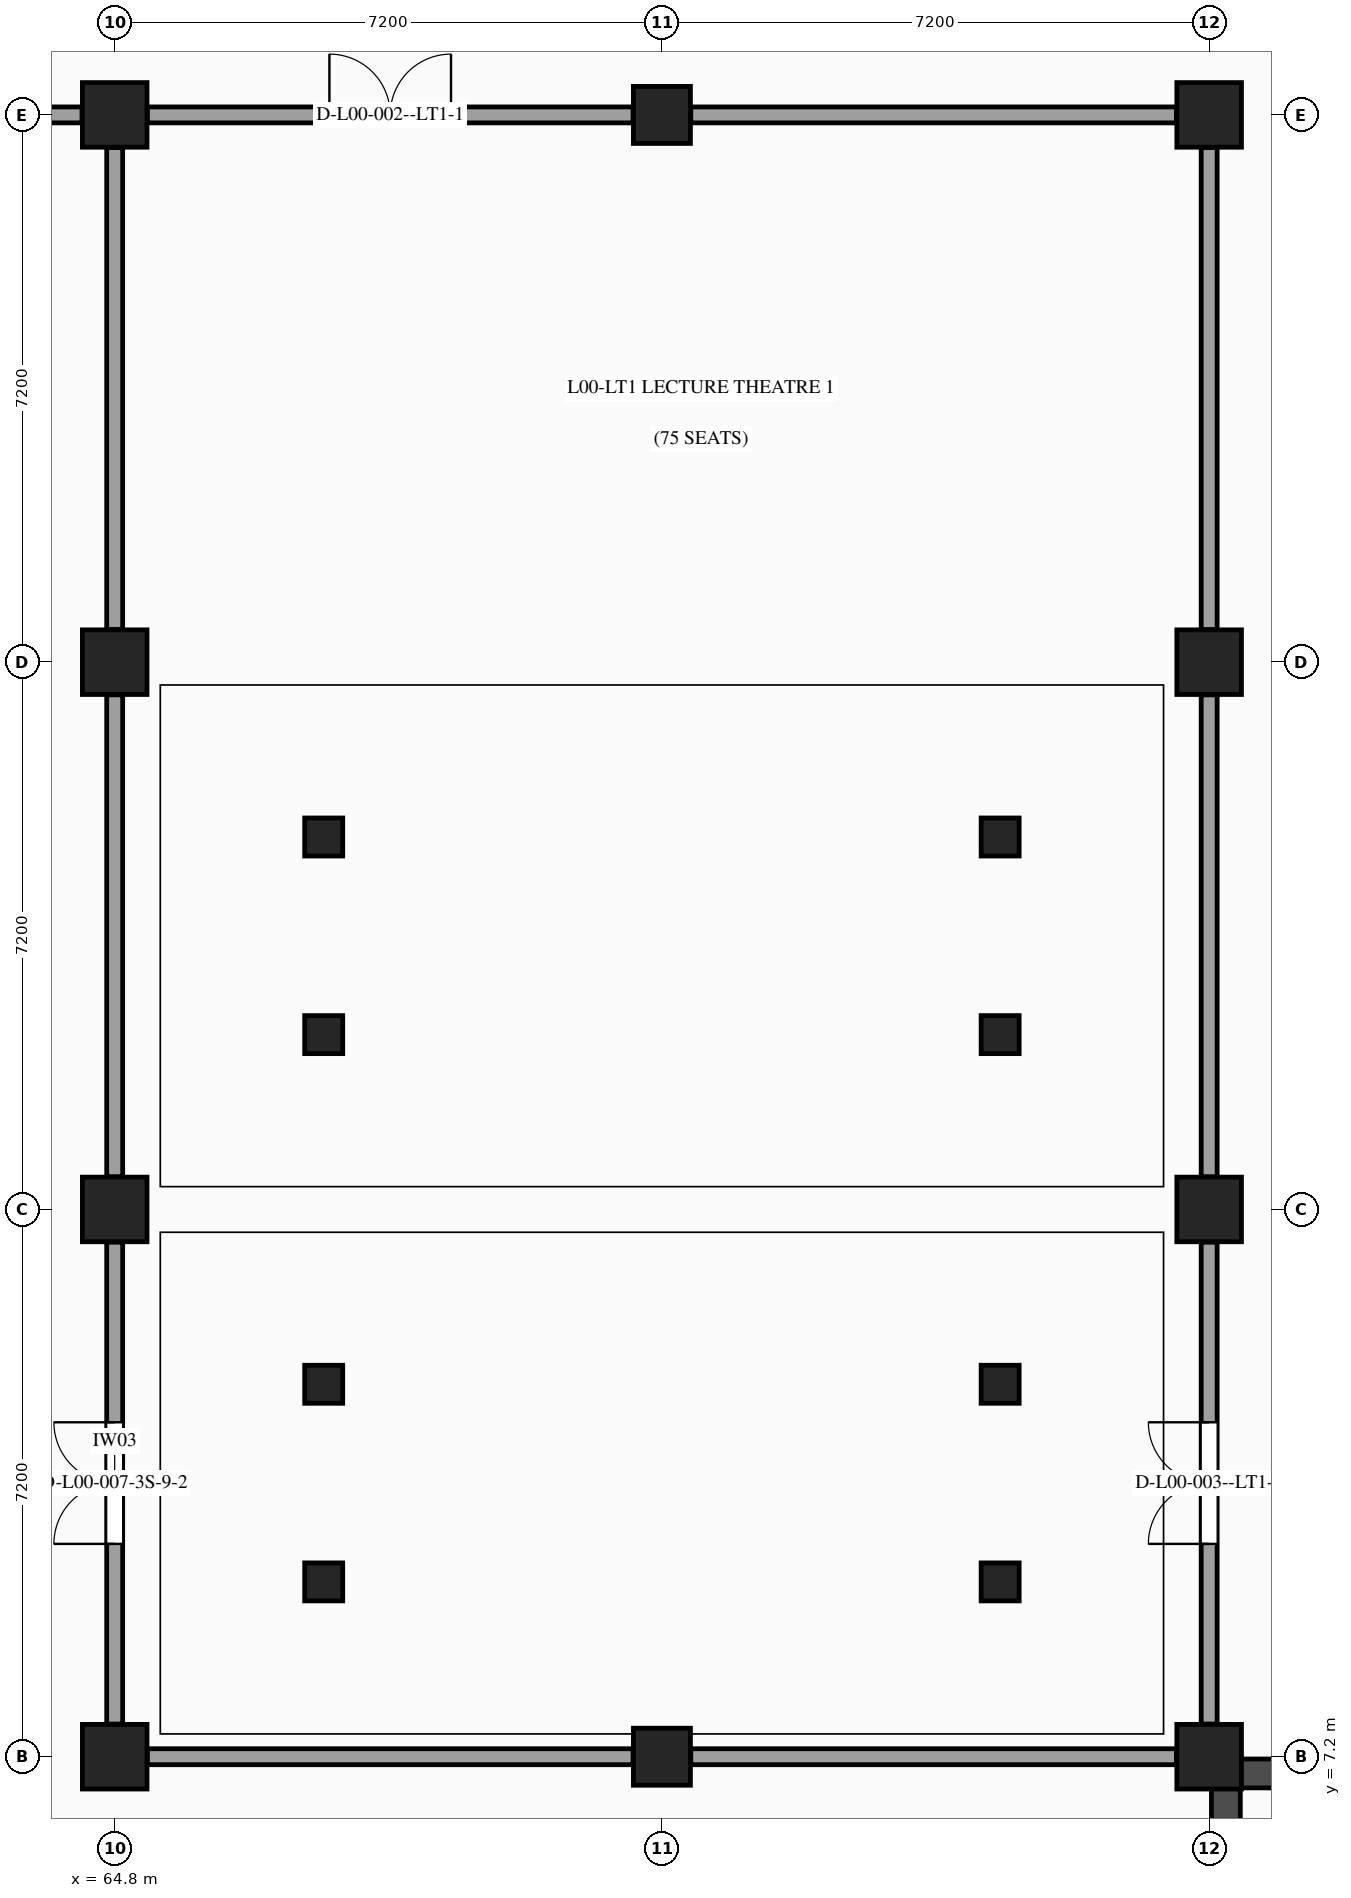
"""IFC4 building model, lengths in metres.
Left out: names, types, materials, properties, quantities, classifications, styles, units other than length and angle.
Written with IfcOpenShell. Run it as: python <this file> out.ifc"""

import sys

from ifc_helpers import new_model, si_unit, direction, frame, frame_2d, origin, origin_2d, place, context, subcontext, project, spatial, rectangle, extrude, element, fill, save


model = new_model("IFC4")
c1 = context("Model", 3, precision=1e-05, world=origin(), true_north=direction((0.0, 1.0)))
c2 = subcontext(c1, "Body", "Model", "MODEL_VIEW")
j1 = project(units=[si_unit("LENGTHUNIT", "METRE"), si_unit("PLANEANGLEUNIT", "RADIAN")], contexts=[c1])
p1 = place(None, origin())
s1 = spatial("IfcSite", under=j1, at=p1, CompositionType="ELEMENT")
p2 = place(p1, origin())
s2 = spatial("IfcBuilding", under=s1, at=p2, CompositionType="ELEMENT")
p3 = place(p2, origin())
s3 = spatial("IfcBuildingStorey", under=s2, at=p3, CompositionType="ELEMENT", Elevation=0.0)
for number, where, z_axis, x_axis in (
    (1, (64.8, 7.2, 0.0), (0.0, 0.0, 1.0), (1.0, 0.0, 0.0)),
    (2, (64.8, 14.4, 0.0), (0.0, 0.0, 1.0), (1.0, 0.0, 0.0)),
    (3, (64.8, 21.6, 0.0), (0.0, 0.0, 1.0), (1.0, 0.0, 0.0)),
    (4, (64.8, 28.8, 0.0), (0.0, 0.0, 1.0), (1.0, 0.0, 0.0)),
):
    element("IfcColumn", number, at=place(p3, frame(where, z_axis=z_axis, x_axis=x_axis)), inside=s3, PredefinedType="COLUMN", context=c2, shape_type="SweptSolid", body=[
        extrude(rectangle(XDim=0.85, YDim=0.85, at=origin_2d()), origin(), (0.0, 0.0, 1.0), 5.4),
    ])
for number, where, z_axis, x_axis in (
    (5, (72.0, 7.2, 0.0), (0.0, 0.0, 1.0), (1.0, 0.0, 0.0)),
    (6, (72.0, 28.8, 0.0), (0.0, 0.0, 1.0), (1.0, 0.0, 0.0)),
):
    element("IfcColumn", number, at=place(p3, frame(where, z_axis=z_axis, x_axis=x_axis)), inside=s3, PredefinedType="COLUMN", context=c2, shape_type="SweptSolid", body=[
        extrude(rectangle(XDim=0.75, YDim=0.75, at=origin_2d()), origin(), (0.0, 0.0, 1.0), 5.4),
    ])
for number, where, z_axis, x_axis in (
    (7, (79.2, 7.2, 0.0), (0.0, 0.0, 1.0), (1.0, 0.0, 0.0)),
    (8, (79.2, 14.4, 0.0), (0.0, 0.0, 1.0), (1.0, 0.0, 0.0)),
    (9, (79.2, 21.6, 0.0), (0.0, 0.0, 1.0), (1.0, 0.0, 0.0)),
    (10, (79.2, 28.8, 0.0), (0.0, 0.0, 1.0), (1.0, 0.0, 0.0)),
):
    element("IfcColumn", number, at=place(p3, frame(where, z_axis=z_axis, x_axis=x_axis)), inside=s3, PredefinedType="COLUMN", context=c2, shape_type="SweptSolid", body=[
        extrude(rectangle(XDim=0.85, YDim=0.85, at=origin_2d()), origin(), (0.0, 0.0, 1.0), 5.4),
    ])
for number, where, z_axis, x_axis in (
    (11, (67.55, 9.5, 0.0), (0.0, 0.0, 1.0), (1.0, 0.0, 0.0)),
    (12, (67.55, 12.1, 0.0), (0.0, 0.0, 1.0), (1.0, 0.0, 0.0)),
    (13, (76.45, 9.5, 0.0), (0.0, 0.0, 1.0), (1.0, 0.0, 0.0)),
    (14, (76.45, 12.1, 0.0), (0.0, 0.0, 1.0), (1.0, 0.0, 0.0)),
):
    element("IfcColumn", number, at=place(p3, frame(where, z_axis=z_axis, x_axis=x_axis)), inside=s3, PredefinedType="COLUMN", context=c2, shape_type="SweptSolid", body=[
        extrude(rectangle(XDim=0.5, YDim=0.5, at=origin_2d()), origin(), (0.0, 0.0, 1.0), 1.27),
    ])
for number, where, z_axis, x_axis in (
    (15, (67.55, 16.7, 0.0), (0.0, 0.0, 1.0), (1.0, 0.0, 0.0)),
    (16, (67.55, 19.3, 0.0), (0.0, 0.0, 1.0), (1.0, 0.0, 0.0)),
    (17, (76.45, 16.7, 0.0), (0.0, 0.0, 1.0), (1.0, 0.0, 0.0)),
    (18, (76.45, 19.3, 0.0), (0.0, 0.0, 1.0), (1.0, 0.0, 0.0)),
):
    element("IfcColumn", number, at=place(p3, frame(where, z_axis=z_axis, x_axis=x_axis)), inside=s3, PredefinedType="COLUMN", context=c2, shape_type="SweptSolid", body=[
        extrude(rectangle(XDim=0.5, YDim=0.5, at=origin_2d()), origin(), (0.0, 0.0, 1.0), 2.77),
    ])
p4 = place(p3, frame((79.42, 7.17, 0.0), z_axis=(0.0, 0.0, 1.0), x_axis=(0.0, -1.0, 0.0)))
e19 = element("IfcWall", 19, at=p4, inside=s3, PredefinedType="SHEAR", context=c2, shape_type="SweptSolid", body=[
    extrude(rectangle(XDim=7.14, YDim=0.38, at=frame_2d((3.57, 0.0))), origin(), (0.0, 0.0, 1.0), 5.09),
])
p5 = place(p3, frame((79.61, 6.98, 0.0), z_axis=(0.0, 0.0, 1.0), x_axis=(1.0, 0.0, 0.0)))
e20 = element("IfcWall", 20, at=p5, inside=s3, PredefinedType="SHEAR", context=c2, shape_type="SweptSolid", body=[
    extrude(rectangle(XDim=6.46, YDim=0.38, at=frame_2d((3.23, 0.0))), origin(), (0.0, 0.0, 1.0), 5.09),
])
p6 = place(p5, frame((1.42, 0.0, 0.0)))
e21 = element("IfcOpeningElement", 21, at=p6, cuts=e20, PredefinedType="OPENING", context=c2, shape_type="SweptSolid", body=[
    extrude(rectangle(XDim=0.85, YDim=2.1, at=frame_2d((0.425, 1.05))), frame((0.0, 0.2, 0.0), z_axis=(0.0, -1.0, 0.0), x_axis=(1.0, 0.0, 0.0)), (0.0, 0.0, 1.0), 0.4),
])
p7 = place(p5, frame((3.2, 0.0, 0.0)))
e22 = element("IfcOpeningElement", 22, at=p7, cuts=e20, PredefinedType="OPENING", context=c2, shape_type="SweptSolid", body=[
    extrude(rectangle(XDim=1.6, YDim=2.2, at=frame_2d((0.8, 1.1))), frame((0.0, 0.2, 0.0), z_axis=(0.0, -1.0, 0.0), x_axis=(1.0, 0.0, 0.0)), (0.0, 0.0, 1.0), 0.4),
])
p8 = place(p3, frame((64.8, 7.63, 0.0), z_axis=(0.0, 0.0, 1.0), x_axis=(0.0, 1.0, 0.0)))
e23 = element("IfcWall", 23, at=p8, inside=s3, PredefinedType="PARTITIONING", context=c2, shape_type="SweptSolid", body=[
    extrude(rectangle(XDim=6.34, YDim=0.21, at=frame_2d((3.17, 0.0))), origin(), (0.0, 0.0, 1.0), 4.405),
])
p9 = place(p8, frame((2.37, 0.0, 0.0)))
e24 = element("IfcOpeningElement", 24, at=p9, cuts=e23, PredefinedType="OPENING", context=c2, shape_type="SweptSolid", body=[
    extrude(rectangle(XDim=1.6, YDim=2.2, at=frame_2d((0.8, 1.1))), frame((0.0, 0.115, 0.0), z_axis=(0.0, -1.0, 0.0), x_axis=(1.0, 0.0, 0.0)), (0.0, 0.0, 1.0), 0.23),
])
p10 = place(p3, frame((64.8, 14.83, 0.0), z_axis=(0.0, 0.0, 1.0), x_axis=(0.0, 1.0, 0.0)))
e25 = element("IfcWall", 25, at=p10, inside=s3, PredefinedType="PARTITIONING", context=c2, shape_type="SweptSolid", body=[
    extrude(rectangle(XDim=6.34, YDim=0.21, at=frame_2d((3.17, 0.0))), origin(), (0.0, 0.0, 1.0), 4.405),
])
p11 = place(p3, frame((64.8, 22.03, 0.0), z_axis=(0.0, 0.0, 1.0), x_axis=(0.0, 1.0, 0.0)))
e26 = element("IfcWall", 26, at=p11, inside=s3, PredefinedType="PARTITIONING", context=c2, shape_type="SweptSolid", body=[
    extrude(rectangle(XDim=6.34, YDim=0.21, at=frame_2d((3.17, 0.0))), origin(), (0.0, 0.0, 1.0), 4.4),
])
p12 = place(p3, frame((57.98, 28.8, 0.0), z_axis=(0.0, 0.0, 1.0), x_axis=(1.0, 0.0, 0.0)))
e27 = element("IfcWall", 27, at=p12, inside=s3, PredefinedType="PARTITIONING", context=c2, shape_type="SweptSolid", body=[
    extrude(rectangle(XDim=6.39, YDim=0.21, at=frame_2d((3.195, 0.0))), origin(), (0.0, 0.0, 1.0), 4.45),
])
p13 = place(p3, frame((65.23, 7.2, 0.0), z_axis=(0.0, 0.0, 1.0), x_axis=(1.0, 0.0, 0.0)))
e28 = element("IfcWall", 28, at=p13, inside=s3, PredefinedType="PARTITIONING", context=c2, shape_type="SweptSolid", body=[
    extrude(rectangle(XDim=6.39, YDim=0.21, at=frame_2d((3.195, 0.0))), origin(), (0.0, 0.0, 1.0), 4.29),
])
p14 = place(p3, frame((65.23, 28.8, 0.0), z_axis=(0.0, 0.0, 1.0), x_axis=(1.0, 0.0, 0.0)))
e29 = element("IfcWall", 29, at=p14, inside=s3, PredefinedType="PARTITIONING", context=c2, shape_type="SweptSolid", body=[
    extrude(rectangle(XDim=6.39, YDim=0.21, at=frame_2d((3.195, 0.0))), origin(), (0.0, 0.0, 1.0), 4.29),
])
p15 = place(p14, frame((2.395, 0.0, 0.0)))
e30 = element("IfcOpeningElement", 30, at=p15, cuts=e29, PredefinedType="OPENING", context=c2, shape_type="SweptSolid", body=[
    extrude(rectangle(XDim=1.6, YDim=2.2, at=frame_2d((0.8, 1.1))), frame((0.0, 0.115, 0.0), z_axis=(0.0, -1.0, 0.0), x_axis=(1.0, 0.0, 0.0)), (0.0, 0.0, 1.0), 0.23),
])
p16 = place(p3, frame((72.38, 7.2, 0.0), z_axis=(0.0, 0.0, 1.0), x_axis=(1.0, 0.0, 0.0)))
e31 = element("IfcWall", 31, at=p16, inside=s3, PredefinedType="PARTITIONING", context=c2, shape_type="SweptSolid", body=[
    extrude(rectangle(XDim=6.39, YDim=0.21, at=frame_2d((3.195, 0.0))), origin(), (0.0, 0.0, 1.0), 4.31),
])
p17 = place(p3, frame((79.2, 7.63, 0.0), z_axis=(0.0, 0.0, 1.0), x_axis=(0.0, 1.0, 0.0)))
e32 = element("IfcWall", 32, at=p17, inside=s3, PredefinedType="PARTITIONING", context=c2, shape_type="SweptSolid", body=[
    extrude(rectangle(XDim=6.34, YDim=0.21, at=frame_2d((3.17, 0.0))), origin(), (0.0, 0.0, 1.0), 4.405),
])
p18 = place(p17, frame((2.37, 0.0, 0.0)))
e33 = element("IfcOpeningElement", 33, at=p18, cuts=e32, PredefinedType="OPENING", context=c2, shape_type="SweptSolid", body=[
    extrude(rectangle(XDim=1.6, YDim=2.2, at=frame_2d((0.8, 1.1))), frame((0.0, 0.115, 0.0), z_axis=(0.0, -1.0, 0.0), x_axis=(1.0, 0.0, 0.0)), (0.0, 0.0, 1.0), 0.23),
])
p19 = place(p3, frame((79.2, 14.83, 0.0), z_axis=(0.0, 0.0, 1.0), x_axis=(0.0, 1.0, 0.0)))
e34 = element("IfcWall", 34, at=p19, inside=s3, PredefinedType="PARTITIONING", context=c2, shape_type="SweptSolid", body=[
    extrude(rectangle(XDim=6.34, YDim=0.21, at=frame_2d((3.17, 0.0))), origin(), (0.0, 0.0, 1.0), 4.405),
])
p20 = place(p3, frame((79.2, 22.03, 0.0), z_axis=(0.0, 0.0, 1.0), x_axis=(0.0, 1.0, 0.0)))
e35 = element("IfcWall", 35, at=p20, inside=s3, PredefinedType="PARTITIONING", context=c2, shape_type="SweptSolid", body=[
    extrude(rectangle(XDim=6.34, YDim=0.21, at=frame_2d((3.17, 0.0))), origin(), (0.0, 0.0, 1.0), 4.4),
])
p21 = place(p3, frame((72.38, 28.8, 0.0), z_axis=(0.0, 0.0, 1.0), x_axis=(1.0, 0.0, 0.0)))
e36 = element("IfcWall", 36, at=p21, inside=s3, PredefinedType="PARTITIONING", context=c2, shape_type="SweptSolid", body=[
    extrude(rectangle(XDim=6.39, YDim=0.21, at=frame_2d((3.195, 0.0))), origin(), (0.0, 0.0, 1.0), 4.31),
])
p22 = place(p15, origin())
e37 = element("IfcDoor", 37, at=p22, inside=s3, OperationType="DOUBLE_DOOR_SINGLE_SWING", PredefinedType="DOOR", context=c2, shape_type="SweptSolid", body=[
    extrude(rectangle(XDim=1.6, YDim=2.2, at=frame_2d((0.8, 1.1))), frame((0.0, 0.025, 0.0), z_axis=(0.0, -1.0, 0.0), x_axis=(1.0, 0.0, 0.0)), (0.0, 0.0, 1.0), 0.05),
])
fill(e30, e37)
p23 = place(p18, origin())
e38 = element("IfcDoor", 38, at=p23, inside=s3, OperationType="DOUBLE_DOOR_SINGLE_SWING", PredefinedType="DOOR", context=c2, shape_type="SweptSolid", body=[
    extrude(rectangle(XDim=1.6, YDim=2.2, at=frame_2d((0.8, 1.1))), frame((0.0, 0.025, 0.0), z_axis=(0.0, -1.0, 0.0), x_axis=(1.0, 0.0, 0.0)), (0.0, 0.0, 1.0), 0.05),
])
fill(e33, e38)
p24 = place(p9, origin())
e39 = element("IfcDoor", 39, at=p24, inside=s3, OperationType="DOUBLE_DOOR_SINGLE_SWING", PredefinedType="DOOR", context=c2, shape_type="SweptSolid", body=[
    extrude(rectangle(XDim=1.6, YDim=2.2, at=frame_2d((0.8, 1.1))), frame((0.0, 0.025, 0.0), z_axis=(0.0, -1.0, 0.0), x_axis=(1.0, 0.0, 0.0)), (0.0, 0.0, 1.0), 0.05),
])
fill(e24, e39)
save(model, sys.argv[1])
